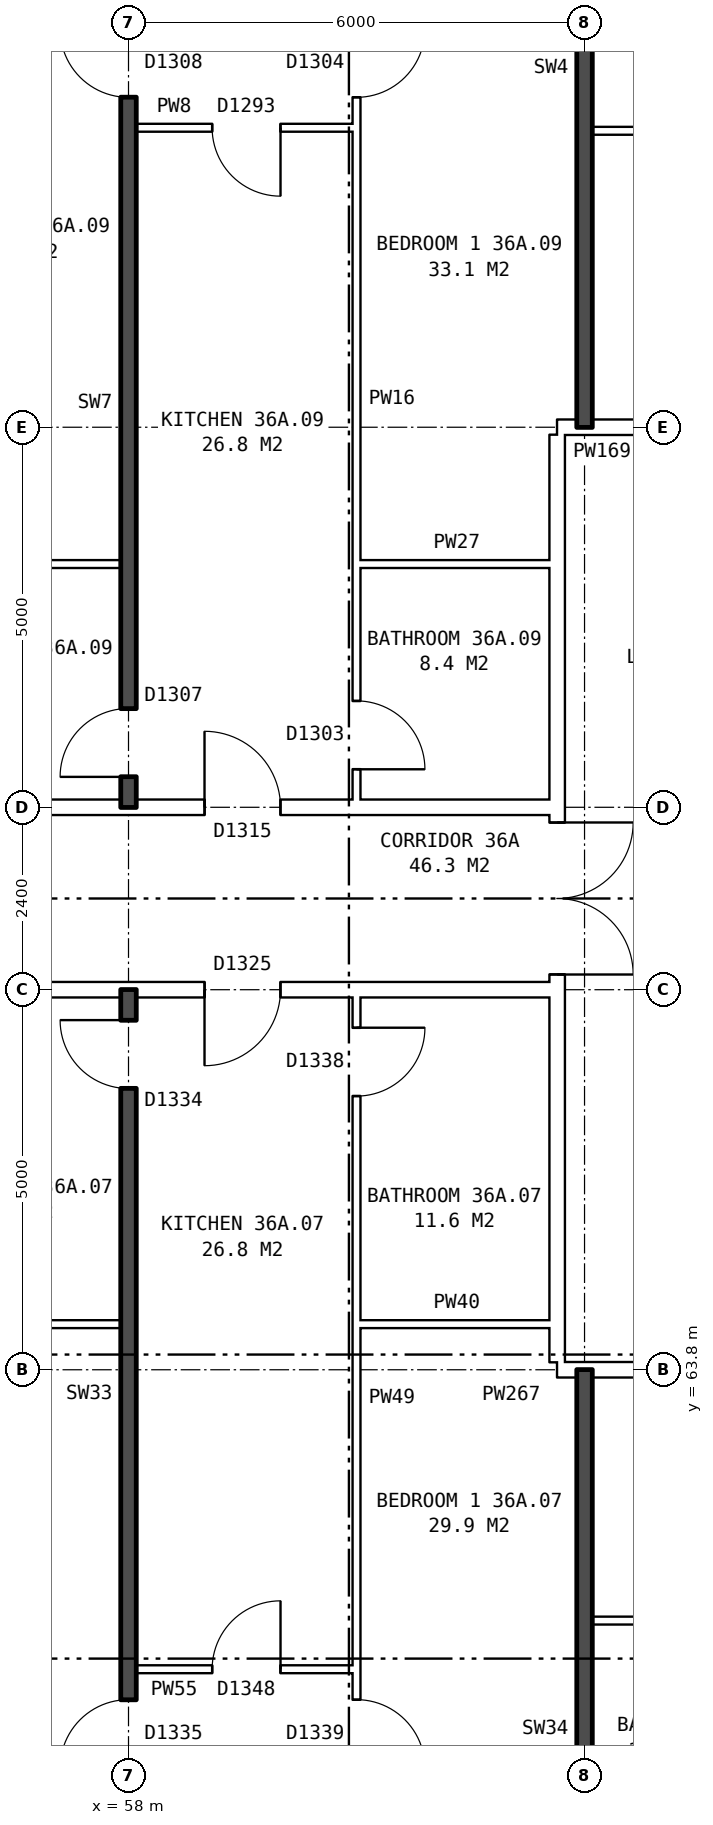
"""IFC4 building model, lengths in metres.
Left out: names, types, materials, properties, quantities, classifications, styles, units other than length and angle.
Written with IfcOpenShell. Run it as: python <this file> out.ifc"""

import sys

from ifc_helpers import new_model, si_unit, direction, frame, frame_2d, origin, place, context, subcontext, project, spatial, rectangle, extrude, element, fill, save


model = new_model("IFC4")
c1 = context("Model", 3, precision=1e-05, world=origin(), true_north=direction((0.0, 1.0)))
c2 = subcontext(c1, "Body", "Model", "MODEL_VIEW")
j1 = project(units=[si_unit("LENGTHUNIT", "METRE"), si_unit("PLANEANGLEUNIT", "RADIAN")], contexts=[c1])
p1 = place(None, origin())
s1 = spatial("IfcSite", under=j1, at=p1, CompositionType="ELEMENT")
p2 = place(p1, origin())
s2 = spatial("IfcBuilding", under=s1, at=p2, CompositionType="ELEMENT")
p3 = place(p2, frame((0.0, 0.0, 129.9)))
s3 = spatial("IfcBuildingStorey", under=s2, at=p3, CompositionType="ELEMENT", Elevation=129.9)
p4 = place(p3, frame((63.64, 63.9, 0.0), z_axis=(0.0, 0.0, 1.0), x_axis=(0.0, 1.0, 0.0)))
e1 = element("IfcWall", 1, at=p4, inside=s3, PredefinedType="PARTITIONING", context=c2, shape_type="SweptSolid", body=[
    extrude(rectangle(XDim=12.2, YDim=0.2, at=frame_2d((6.1, 0.0))), origin(), (0.0, 0.0, 1.0), 2.85),
])
p5 = place(p4, frame((5.1, 0.0, 0.0)))
e2 = element("IfcOpeningElement", 2, at=p5, cuts=e1, PredefinedType="OPENING", context=c2, shape_type="SweptSolid", body=[
    extrude(rectangle(XDim=2.0, YDim=2.1, at=frame_2d((1.0, 1.05))), frame((0.0, 0.11, 0.0), z_axis=(0.0, -1.0, 0.0), x_axis=(1.0, 0.0, 0.0)), (0.0, 0.0, 1.0), 0.22),
])
p6 = place(p3, frame((58.1, 59.86, 0.0), z_axis=(0.0, 0.0, 1.0), x_axis=(1.0, 0.0, 0.0)))
e3 = element("IfcWall", 3, at=p6, inside=s3, PredefinedType="PARTITIONING", context=c2, shape_type="SweptSolid", body=[
    extrude(rectangle(XDim=2.9, YDim=0.1, at=frame_2d((1.45, 0.0))), origin(), (0.0, 0.0, 1.0), 2.85),
])
p7 = place(p6, frame((1.0, 0.0, 0.0)))
e4 = element("IfcOpeningElement", 4, at=p7, cuts=e3, PredefinedType="OPENING", context=c2, shape_type="SweptSolid", body=[
    extrude(rectangle(XDim=0.9, YDim=2.1, at=frame_2d((0.45, 1.05))), frame((0.0, 0.06, 0.0), z_axis=(0.0, -1.0, 0.0), x_axis=(1.0, 0.0, 0.0)), (0.0, 0.0, 1.0), 0.12),
])
p8 = place(p3, frame((64.1, 60.5, 0.0), z_axis=(0.0, 0.0, 1.0), x_axis=(1.0, 0.0, 0.0)))
e5 = element("IfcWall", 5, at=p8, inside=s3, PredefinedType="PARTITIONING", context=c2, shape_type="SweptSolid", body=[
    extrude(rectangle(XDim=5.8, YDim=0.1, at=frame_2d((2.9, 0.0))), origin(), (0.0, 0.0, 1.0), 2.85),
])
p9 = place(p8, frame((3.6, 0.0, 0.0)))
e6 = element("IfcOpeningElement", 6, at=p9, cuts=e5, PredefinedType="OPENING", context=c2, shape_type="SweptSolid", body=[
    extrude(rectangle(XDim=0.9, YDim=2.1, at=frame_2d((0.45, 1.05))), frame((0.0, 0.06, 0.0), z_axis=(0.0, -1.0, 0.0), x_axis=(1.0, 0.0, 0.0)), (0.0, 0.0, 1.0), 0.12),
])
p10 = place(p8, frame((0.7, 0.0, 0.0)))
e7 = element("IfcOpeningElement", 7, at=p10, cuts=e5, PredefinedType="OPENING", context=c2, shape_type="SweptSolid", body=[
    extrude(rectangle(XDim=0.9, YDim=2.1, at=frame_2d((0.45, 1.05))), frame((0.0, 0.06, 0.0), z_axis=(0.0, -1.0, 0.0), x_axis=(1.0, 0.0, 0.0)), (0.0, 0.0, 1.0), 0.12),
])
p11 = place(p3, frame((63.64, 63.8, 0.0), z_axis=(0.0, 0.0, 1.0), x_axis=(1.0, 0.0, 0.0)))
e8 = element("IfcWall", 8, at=p11, inside=s3, PredefinedType="PARTITIONING", context=c2, shape_type="SweptSolid", body=[
    extrude(rectangle(XDim=3.0, YDim=0.2, at=frame_2d((1.5, 0.0))), origin(), (0.0, 0.0, 1.0), 2.85),
])
p12 = place(p11, frame((1.18, 0.0, 0.0)))
e9 = element("IfcOpeningElement", 9, at=p12, cuts=e8, PredefinedType="OPENING", context=c2, shape_type="SweptSolid", body=[
    extrude(rectangle(XDim=1.0, YDim=2.1, at=frame_2d((0.5, 1.05))), frame((0.0, 0.11, 0.0), z_axis=(0.0, -1.0, 0.0), x_axis=(1.0, 0.0, 0.0)), (0.0, 0.0, 1.0), 0.22),
])
p13 = place(p3, frame((55.1, 64.4, 0.0), z_axis=(0.0, 0.0, 1.0), x_axis=(1.0, 0.0, 0.0)))
e10 = element("IfcWall", 10, at=p13, inside=s3, PredefinedType="PARTITIONING", context=c2, shape_type="SweptSolid", body=[
    extrude(rectangle(XDim=2.8, YDim=0.1, at=frame_2d((1.4, 0.0))), origin(), (0.0, 0.0, 1.0), 2.85),
])
p14 = place(p3, frame((61.0, 64.4, 0.0), z_axis=(0.0, 0.0, 1.0), x_axis=(1.0, 0.0, 0.0)))
e11 = element("IfcWall", 11, at=p14, inside=s3, PredefinedType="PARTITIONING", context=c2, shape_type="SweptSolid", body=[
    extrude(rectangle(XDim=2.64, YDim=0.1, at=frame_2d((1.32, 0.0))), origin(), (0.0, 0.0, 1.0), 2.85),
])
p15 = place(p3, frame((44.36, 68.8, 0.0), z_axis=(0.0, 0.0, 1.0), x_axis=(1.0, 0.0, 0.0)))
e12 = element("IfcWall", 12, at=p15, inside=s3, PredefinedType="PARTITIONING", context=c2, shape_type="SweptSolid", body=[
    extrude(rectangle(XDim=19.28, YDim=0.2, at=frame_2d((9.64, 0.0))), origin(), (0.0, 0.0, 1.0), 2.85),
])
p16 = place(p15, frame((14.64, 0.0, 0.0)))
e13 = element("IfcOpeningElement", 13, at=p16, cuts=e12, PredefinedType="OPENING", context=c2, shape_type="SweptSolid", body=[
    extrude(rectangle(XDim=1.0, YDim=2.1, at=frame_2d((0.5, 1.05))), frame((0.0, 0.11, 0.0), z_axis=(0.0, -1.0, 0.0), x_axis=(1.0, 0.0, 0.0)), (0.0, 0.0, 1.0), 0.22),
])
p17 = place(p15, frame((5.64, 0.0, 0.0)))
e14 = element("IfcOpeningElement", 14, at=p17, cuts=e12, PredefinedType="OPENING", context=c2, shape_type="SweptSolid", body=[
    extrude(rectangle(XDim=1.0, YDim=2.1, at=frame_2d((0.5, 1.05))), frame((0.0, 0.11, 0.0), z_axis=(0.0, -1.0, 0.0), x_axis=(1.0, 0.0, 0.0)), (0.0, 0.0, 1.0), 0.22),
])
p18 = place(p3, frame((44.36, 71.2, 0.0), z_axis=(0.0, 0.0, 1.0), x_axis=(1.0, 0.0, 0.0)))
e15 = element("IfcWall", 15, at=p18, inside=s3, PredefinedType="PARTITIONING", context=c2, shape_type="SweptSolid", body=[
    extrude(rectangle(XDim=19.28, YDim=0.2, at=frame_2d((9.64, 0.0))), origin(), (0.0, 0.0, 1.0), 2.85),
])
p19 = place(p18, frame((14.64, 0.0, 0.0)))
e16 = element("IfcOpeningElement", 16, at=p19, cuts=e15, PredefinedType="OPENING", context=c2, shape_type="SweptSolid", body=[
    extrude(rectangle(XDim=1.0, YDim=2.1, at=frame_2d((0.5, 1.05))), frame((0.0, 0.11, 0.0), z_axis=(0.0, -1.0, 0.0), x_axis=(1.0, 0.0, 0.0)), (0.0, 0.0, 1.0), 0.22),
])
p20 = place(p18, frame((5.64, 0.0, 0.0)))
e17 = element("IfcOpeningElement", 17, at=p20, cuts=e15, PredefinedType="OPENING", context=c2, shape_type="SweptSolid", body=[
    extrude(rectangle(XDim=1.0, YDim=2.1, at=frame_2d((0.5, 1.05))), frame((0.0, 0.11, 0.0), z_axis=(0.0, -1.0, 0.0), x_axis=(1.0, 0.0, 0.0)), (0.0, 0.0, 1.0), 0.22),
])
p21 = place(p3, frame((55.1, 74.4, 0.0), z_axis=(0.0, 0.0, 1.0), x_axis=(1.0, 0.0, 0.0)))
e18 = element("IfcWall", 18, at=p21, inside=s3, PredefinedType="PARTITIONING", context=c2, shape_type="SweptSolid", body=[
    extrude(rectangle(XDim=2.8, YDim=0.1, at=frame_2d((1.4, 0.0))), origin(), (0.0, 0.0, 1.0), 2.85),
])
p22 = place(p3, frame((61.0, 74.4, 0.0), z_axis=(0.0, 0.0, 1.0), x_axis=(1.0, 0.0, 0.0)))
e19 = element("IfcWall", 19, at=p22, inside=s3, PredefinedType="PARTITIONING", context=c2, shape_type="SweptSolid", body=[
    extrude(rectangle(XDim=2.64, YDim=0.1, at=frame_2d((1.32, 0.0))), origin(), (0.0, 0.0, 1.0), 2.85),
])
p23 = place(p3, frame((63.64, 76.2, 0.0), z_axis=(0.0, 0.0, 1.0), x_axis=(1.0, 0.0, 0.0)))
e20 = element("IfcWall", 20, at=p23, inside=s3, PredefinedType="PARTITIONING", context=c2, shape_type="SweptSolid", body=[
    extrude(rectangle(XDim=3.0, YDim=0.2, at=frame_2d((1.5, 0.0))), origin(), (0.0, 0.0, 1.0), 2.85),
])
p24 = place(p23, frame((1.18, 0.0, 0.0)))
e21 = element("IfcOpeningElement", 21, at=p24, cuts=e20, PredefinedType="OPENING", context=c2, shape_type="SweptSolid", body=[
    extrude(rectangle(XDim=1.0, YDim=2.1, at=frame_2d((0.5, 1.05))), frame((0.0, 0.11, 0.0), z_axis=(0.0, -1.0, 0.0), x_axis=(1.0, 0.0, 0.0)), (0.0, 0.0, 1.0), 0.22),
])
p25 = place(p3, frame((64.1, 80.1, 0.0), z_axis=(0.0, 0.0, 1.0), x_axis=(1.0, 0.0, 0.0)))
e22 = element("IfcWall", 22, at=p25, inside=s3, PredefinedType="PARTITIONING", context=c2, shape_type="SweptSolid", body=[
    extrude(rectangle(XDim=5.8, YDim=0.1, at=frame_2d((2.9, 0.0))), origin(), (0.0, 0.0, 1.0), 2.85),
])
p26 = place(p25, frame((3.6, 0.0, 0.0)))
e23 = element("IfcOpeningElement", 23, at=p26, cuts=e22, PredefinedType="OPENING", context=c2, shape_type="SweptSolid", body=[
    extrude(rectangle(XDim=0.9, YDim=2.1, at=frame_2d((0.45, 1.05))), frame((0.0, 0.06, 0.0), z_axis=(0.0, -1.0, 0.0), x_axis=(1.0, 0.0, 0.0)), (0.0, 0.0, 1.0), 0.12),
])
p27 = place(p25, frame((0.7, 0.0, 0.0)))
e24 = element("IfcOpeningElement", 24, at=p27, cuts=e22, PredefinedType="OPENING", context=c2, shape_type="SweptSolid", body=[
    extrude(rectangle(XDim=0.9, YDim=2.1, at=frame_2d((0.45, 1.05))), frame((0.0, 0.06, 0.0), z_axis=(0.0, -1.0, 0.0), x_axis=(1.0, 0.0, 0.0)), (0.0, 0.0, 1.0), 0.12),
])
p28 = place(p3, frame((58.1, 80.14, 0.0), z_axis=(0.0, 0.0, 1.0), x_axis=(1.0, 0.0, 0.0)))
e25 = element("IfcWall", 25, at=p28, inside=s3, PredefinedType="PARTITIONING", context=c2, shape_type="SweptSolid", body=[
    extrude(rectangle(XDim=2.9, YDim=0.1, at=frame_2d((1.45, 0.0))), origin(), (0.0, 0.0, 1.0), 2.85),
])
p29 = place(p28, frame((1.0, 0.0, 0.0)))
e26 = element("IfcOpeningElement", 26, at=p29, cuts=e25, PredefinedType="OPENING", context=c2, shape_type="SweptSolid", body=[
    extrude(rectangle(XDim=0.9, YDim=2.1, at=frame_2d((0.45, 1.05))), frame((0.0, 0.06, 0.0), z_axis=(0.0, -1.0, 0.0), x_axis=(1.0, 0.0, 0.0)), (0.0, 0.0, 1.0), 0.12),
])
p30 = place(p3, frame((58.0, 54.36, 0.0), z_axis=(0.0, 0.0, 1.0), x_axis=(0.0, 1.0, 0.0)))
e27 = element("IfcWall", 27, at=p30, inside=s3, PredefinedType="SOLIDWALL", context=c2, shape_type="SweptSolid", body=[
    extrude(rectangle(XDim=14.44, YDim=0.2, at=frame_2d((7.22, 0.0))), origin(), (0.0, 0.0, 1.0), 2.85),
])
p31 = place(p30, frame((4.2, 0.0, 0.0)))
e28 = element("IfcOpeningElement", 28, at=p31, cuts=e27, PredefinedType="OPENING", context=c2, shape_type="SweptSolid", body=[
    extrude(rectangle(XDim=0.9, YDim=2.1, at=frame_2d((0.45, 1.05))), frame((0.0, 0.11, 0.0), z_axis=(0.0, -1.0, 0.0), x_axis=(1.0, 0.0, 0.0)), (0.0, 0.0, 1.0), 0.22),
])
p32 = place(p30, frame((13.14, 0.0, 0.0)))
e29 = element("IfcOpeningElement", 29, at=p32, cuts=e27, PredefinedType="OPENING", context=c2, shape_type="SweptSolid", body=[
    extrude(rectangle(XDim=0.9, YDim=2.1, at=frame_2d((0.45, 1.05))), frame((0.0, 0.11, 0.0), z_axis=(0.0, -1.0, 0.0), x_axis=(1.0, 0.0, 0.0)), (0.0, 0.0, 1.0), 0.22),
])
p33 = place(p3, frame((58.0, 71.2, 0.0), z_axis=(0.0, 0.0, 1.0), x_axis=(0.0, 1.0, 0.0)))
e30 = element("IfcWall", 30, at=p33, inside=s3, PredefinedType="SOLIDWALL", context=c2, shape_type="SweptSolid", body=[
    extrude(rectangle(XDim=14.44, YDim=0.2, at=frame_2d((7.22, 0.0))), origin(), (0.0, 0.0, 1.0), 2.85),
])
p34 = place(p33, frame((9.34, 0.0, 0.0)))
e31 = element("IfcOpeningElement", 31, at=p34, cuts=e30, PredefinedType="OPENING", context=c2, shape_type="SweptSolid", body=[
    extrude(rectangle(XDim=0.9, YDim=2.1, at=frame_2d((0.45, 1.05))), frame((0.0, 0.11, 0.0), z_axis=(0.0, -1.0, 0.0), x_axis=(1.0, 0.0, 0.0)), (0.0, 0.0, 1.0), 0.22),
])
p35 = place(p33, frame((0.4, 0.0, 0.0)))
e32 = element("IfcOpeningElement", 32, at=p35, cuts=e30, PredefinedType="OPENING", context=c2, shape_type="SweptSolid", body=[
    extrude(rectangle(XDim=0.9, YDim=2.1, at=frame_2d((0.45, 1.05))), frame((0.0, 0.11, 0.0), z_axis=(0.0, -1.0, 0.0), x_axis=(1.0, 0.0, 0.0)), (0.0, 0.0, 1.0), 0.22),
])
p36 = place(p3, frame((61.0, 54.36, 0.0), z_axis=(0.0, 0.0, 1.0), x_axis=(0.0, 1.0, 0.0)))
e33 = element("IfcWall", 33, at=p36, inside=s3, PredefinedType="PARTITIONING", context=c2, shape_type="SweptSolid", body=[
    extrude(rectangle(XDim=14.34, YDim=0.1, at=frame_2d((7.17, 0.0))), origin(), (0.0, 0.0, 1.0), 2.85),
])
p37 = place(p36, frame((4.2, 0.0, 0.0)))
e34 = element("IfcOpeningElement", 34, at=p37, cuts=e33, PredefinedType="OPENING", context=c2, shape_type="SweptSolid", body=[
    extrude(rectangle(XDim=0.9, YDim=2.1, at=frame_2d((0.45, 1.05))), frame((0.0, 0.06, 0.0), z_axis=(0.0, -1.0, 0.0), x_axis=(1.0, 0.0, 0.0)), (0.0, 0.0, 1.0), 0.12),
])
p38 = place(p36, frame((13.04, 0.0, 0.0)))
e35 = element("IfcOpeningElement", 35, at=p38, cuts=e33, PredefinedType="OPENING", context=c2, shape_type="SweptSolid", body=[
    extrude(rectangle(XDim=0.9, YDim=2.1, at=frame_2d((0.45, 1.05))), frame((0.0, 0.06, 0.0), z_axis=(0.0, -1.0, 0.0), x_axis=(1.0, 0.0, 0.0)), (0.0, 0.0, 1.0), 0.12),
])
p39 = place(p3, frame((61.0, 71.3, 0.0), z_axis=(0.0, 0.0, 1.0), x_axis=(0.0, 1.0, 0.0)))
e36 = element("IfcWall", 36, at=p39, inside=s3, PredefinedType="PARTITIONING", context=c2, shape_type="SweptSolid", body=[
    extrude(rectangle(XDim=14.34, YDim=0.1, at=frame_2d((7.17, 0.0))), origin(), (0.0, 0.0, 1.0), 2.85),
])
p40 = place(p39, frame((9.24, 0.0, 0.0)))
e37 = element("IfcOpeningElement", 37, at=p40, cuts=e36, PredefinedType="OPENING", context=c2, shape_type="SweptSolid", body=[
    extrude(rectangle(XDim=0.9, YDim=2.1, at=frame_2d((0.45, 1.05))), frame((0.0, 0.06, 0.0), z_axis=(0.0, -1.0, 0.0), x_axis=(1.0, 0.0, 0.0)), (0.0, 0.0, 1.0), 0.12),
])
p41 = place(p39, frame((0.4, 0.0, 0.0)))
e38 = element("IfcOpeningElement", 38, at=p41, cuts=e36, PredefinedType="OPENING", context=c2, shape_type="SweptSolid", body=[
    extrude(rectangle(XDim=0.9, YDim=2.1, at=frame_2d((0.45, 1.05))), frame((0.0, 0.06, 0.0), z_axis=(0.0, -1.0, 0.0), x_axis=(1.0, 0.0, 0.0)), (0.0, 0.0, 1.0), 0.12),
])
for number, where, z_axis, x_axis in (
    (39, (64.0, 54.36, 0.0), (0.0, 0.0, 1.0), (0.0, 1.0, 0.0)),
    (40, (64.0, 76.2, 0.0), (0.0, 0.0, 1.0), (0.0, 1.0, 0.0)),
):
    element("IfcWall", number, at=place(p3, frame(where, z_axis=z_axis, x_axis=x_axis)), inside=s3, PredefinedType="SOLIDWALL", context=c2, shape_type="SweptSolid", body=[
        extrude(rectangle(XDim=9.44, YDim=0.2, at=frame_2d((4.72, 0.0))), origin(), (0.0, 0.0, 1.0), 2.85),
    ])
p42 = place(p5, frame((2.0, 0.0, 0.0), z_axis=(0.0, 0.0, 1.0), x_axis=(-1.0, 0.0, 0.0)))
e41 = element("IfcDoor", 41, at=p42, inside=s3, OperationType="DOUBLE_DOOR_SINGLE_SWING", PredefinedType="DOOR", context=c2, shape_type="SweptSolid", body=[
    extrude(rectangle(XDim=2.0, YDim=2.1, at=frame_2d((1.0, 1.05))), frame((0.0, 0.025, 0.0), z_axis=(0.0, -1.0, 0.0), x_axis=(1.0, 0.0, 0.0)), (0.0, 0.0, 1.0), 0.05),
])
fill(e2, e41)
p43 = place(p37, frame((0.9, 0.0, 0.0), z_axis=(0.0, 0.0, 1.0), x_axis=(-1.0, 0.0, 0.0)))
e42 = element("IfcDoor", 42, at=p43, inside=s3, OperationType="SINGLE_SWING_RIGHT", PredefinedType="DOOR", context=c2, shape_type="SweptSolid", body=[
    extrude(rectangle(XDim=0.9, YDim=2.1, at=frame_2d((0.45, 1.05))), frame((0.0, 0.025, 0.0), z_axis=(0.0, -1.0, 0.0), x_axis=(1.0, 0.0, 0.0)), (0.0, 0.0, 1.0), 0.05),
])
fill(e34, e42)
p44 = place(p31, origin())
e43 = element("IfcDoor", 43, at=p44, inside=s3, OperationType="SINGLE_SWING_LEFT", PredefinedType="DOOR", context=c2, shape_type="SweptSolid", body=[
    extrude(rectangle(XDim=0.9, YDim=2.1, at=frame_2d((0.45, 1.05))), frame((0.0, 0.025, 0.0), z_axis=(0.0, -1.0, 0.0), x_axis=(1.0, 0.0, 0.0)), (0.0, 0.0, 1.0), 0.05),
])
fill(e28, e43)
p45 = place(p16, frame((1.0, 0.0, 0.0), z_axis=(0.0, 0.0, 1.0), x_axis=(-1.0, 0.0, 0.0)))
e44 = element("IfcDoor", 44, at=p45, inside=s3, OperationType="SINGLE_SWING_RIGHT", PredefinedType="DOOR", context=c2, shape_type="SweptSolid", body=[
    extrude(rectangle(XDim=1.0, YDim=2.1, at=frame_2d((0.5, 1.05))), frame((0.0, 0.025, 0.0), z_axis=(0.0, -1.0, 0.0), x_axis=(1.0, 0.0, 0.0)), (0.0, 0.0, 1.0), 0.05),
])
fill(e13, e44)
p46 = place(p7, origin())
e45 = element("IfcDoor", 45, at=p46, inside=s3, OperationType="SINGLE_SWING_RIGHT", PredefinedType="DOOR", context=c2, shape_type="SweptSolid", body=[
    extrude(rectangle(XDim=0.9, YDim=2.1, at=frame_2d((0.45, 1.05))), frame((0.0, 0.025, 0.0), z_axis=(0.0, -1.0, 0.0), x_axis=(1.0, 0.0, 0.0)), (0.0, 0.0, 1.0), 0.05),
])
fill(e4, e45)
p47 = place(p38, frame((0.9, 0.0, 0.0), z_axis=(0.0, 0.0, 1.0), x_axis=(-1.0, 0.0, 0.0)))
e46 = element("IfcDoor", 46, at=p47, inside=s3, OperationType="SINGLE_SWING_LEFT", PredefinedType="DOOR", context=c2, shape_type="SweptSolid", body=[
    extrude(rectangle(XDim=0.9, YDim=2.1, at=frame_2d((0.45, 1.05))), frame((0.0, 0.025, 0.0), z_axis=(0.0, -1.0, 0.0), x_axis=(1.0, 0.0, 0.0)), (0.0, 0.0, 1.0), 0.05),
])
fill(e35, e46)
p48 = place(p32, origin())
e47 = element("IfcDoor", 47, at=p48, inside=s3, OperationType="SINGLE_SWING_RIGHT", PredefinedType="DOOR", context=c2, shape_type="SweptSolid", body=[
    extrude(rectangle(XDim=0.9, YDim=2.1, at=frame_2d((0.45, 1.05))), frame((0.0, 0.025, 0.0), z_axis=(0.0, -1.0, 0.0), x_axis=(1.0, 0.0, 0.0)), (0.0, 0.0, 1.0), 0.05),
])
fill(e29, e47)
p49 = place(p40, frame((0.9, 0.0, 0.0), z_axis=(0.0, 0.0, 1.0), x_axis=(-1.0, 0.0, 0.0)))
e48 = element("IfcDoor", 48, at=p49, inside=s3, OperationType="SINGLE_SWING_LEFT", PredefinedType="DOOR", context=c2, shape_type="SweptSolid", body=[
    extrude(rectangle(XDim=0.9, YDim=2.1, at=frame_2d((0.45, 1.05))), frame((0.0, 0.025, 0.0), z_axis=(0.0, -1.0, 0.0), x_axis=(1.0, 0.0, 0.0)), (0.0, 0.0, 1.0), 0.05),
])
fill(e37, e48)
p50 = place(p34, origin())
e49 = element("IfcDoor", 49, at=p50, inside=s3, OperationType="SINGLE_SWING_RIGHT", PredefinedType="DOOR", context=c2, shape_type="SweptSolid", body=[
    extrude(rectangle(XDim=0.9, YDim=2.1, at=frame_2d((0.45, 1.05))), frame((0.0, 0.025, 0.0), z_axis=(0.0, -1.0, 0.0), x_axis=(1.0, 0.0, 0.0)), (0.0, 0.0, 1.0), 0.05),
])
fill(e31, e49)
p51 = place(p19, origin())
e50 = element("IfcDoor", 50, at=p51, inside=s3, OperationType="SINGLE_SWING_LEFT", PredefinedType="DOOR", context=c2, shape_type="SweptSolid", body=[
    extrude(rectangle(XDim=1.0, YDim=2.1, at=frame_2d((0.5, 1.05))), frame((0.0, 0.025, 0.0), z_axis=(0.0, -1.0, 0.0), x_axis=(1.0, 0.0, 0.0)), (0.0, 0.0, 1.0), 0.05),
])
fill(e16, e50)
p52 = place(p29, frame((0.9, 0.0, 0.0), z_axis=(0.0, 0.0, 1.0), x_axis=(-1.0, 0.0, 0.0)))
e51 = element("IfcDoor", 51, at=p52, inside=s3, OperationType="SINGLE_SWING_LEFT", PredefinedType="DOOR", context=c2, shape_type="SweptSolid", body=[
    extrude(rectangle(XDim=0.9, YDim=2.1, at=frame_2d((0.45, 1.05))), frame((0.0, 0.025, 0.0), z_axis=(0.0, -1.0, 0.0), x_axis=(1.0, 0.0, 0.0)), (0.0, 0.0, 1.0), 0.05),
])
fill(e26, e51)
p53 = place(p41, frame((0.9, 0.0, 0.0), z_axis=(0.0, 0.0, 1.0), x_axis=(-1.0, 0.0, 0.0)))
e52 = element("IfcDoor", 52, at=p53, inside=s3, OperationType="SINGLE_SWING_RIGHT", PredefinedType="DOOR", context=c2, shape_type="SweptSolid", body=[
    extrude(rectangle(XDim=0.9, YDim=2.1, at=frame_2d((0.45, 1.05))), frame((0.0, 0.025, 0.0), z_axis=(0.0, -1.0, 0.0), x_axis=(1.0, 0.0, 0.0)), (0.0, 0.0, 1.0), 0.05),
])
fill(e38, e52)
p54 = place(p35, origin())
e53 = element("IfcDoor", 53, at=p54, inside=s3, OperationType="SINGLE_SWING_LEFT", PredefinedType="DOOR", context=c2, shape_type="SweptSolid", body=[
    extrude(rectangle(XDim=0.9, YDim=2.1, at=frame_2d((0.45, 1.05))), frame((0.0, 0.025, 0.0), z_axis=(0.0, -1.0, 0.0), x_axis=(1.0, 0.0, 0.0)), (0.0, 0.0, 1.0), 0.05),
])
fill(e32, e53)
save(model, sys.argv[1])
